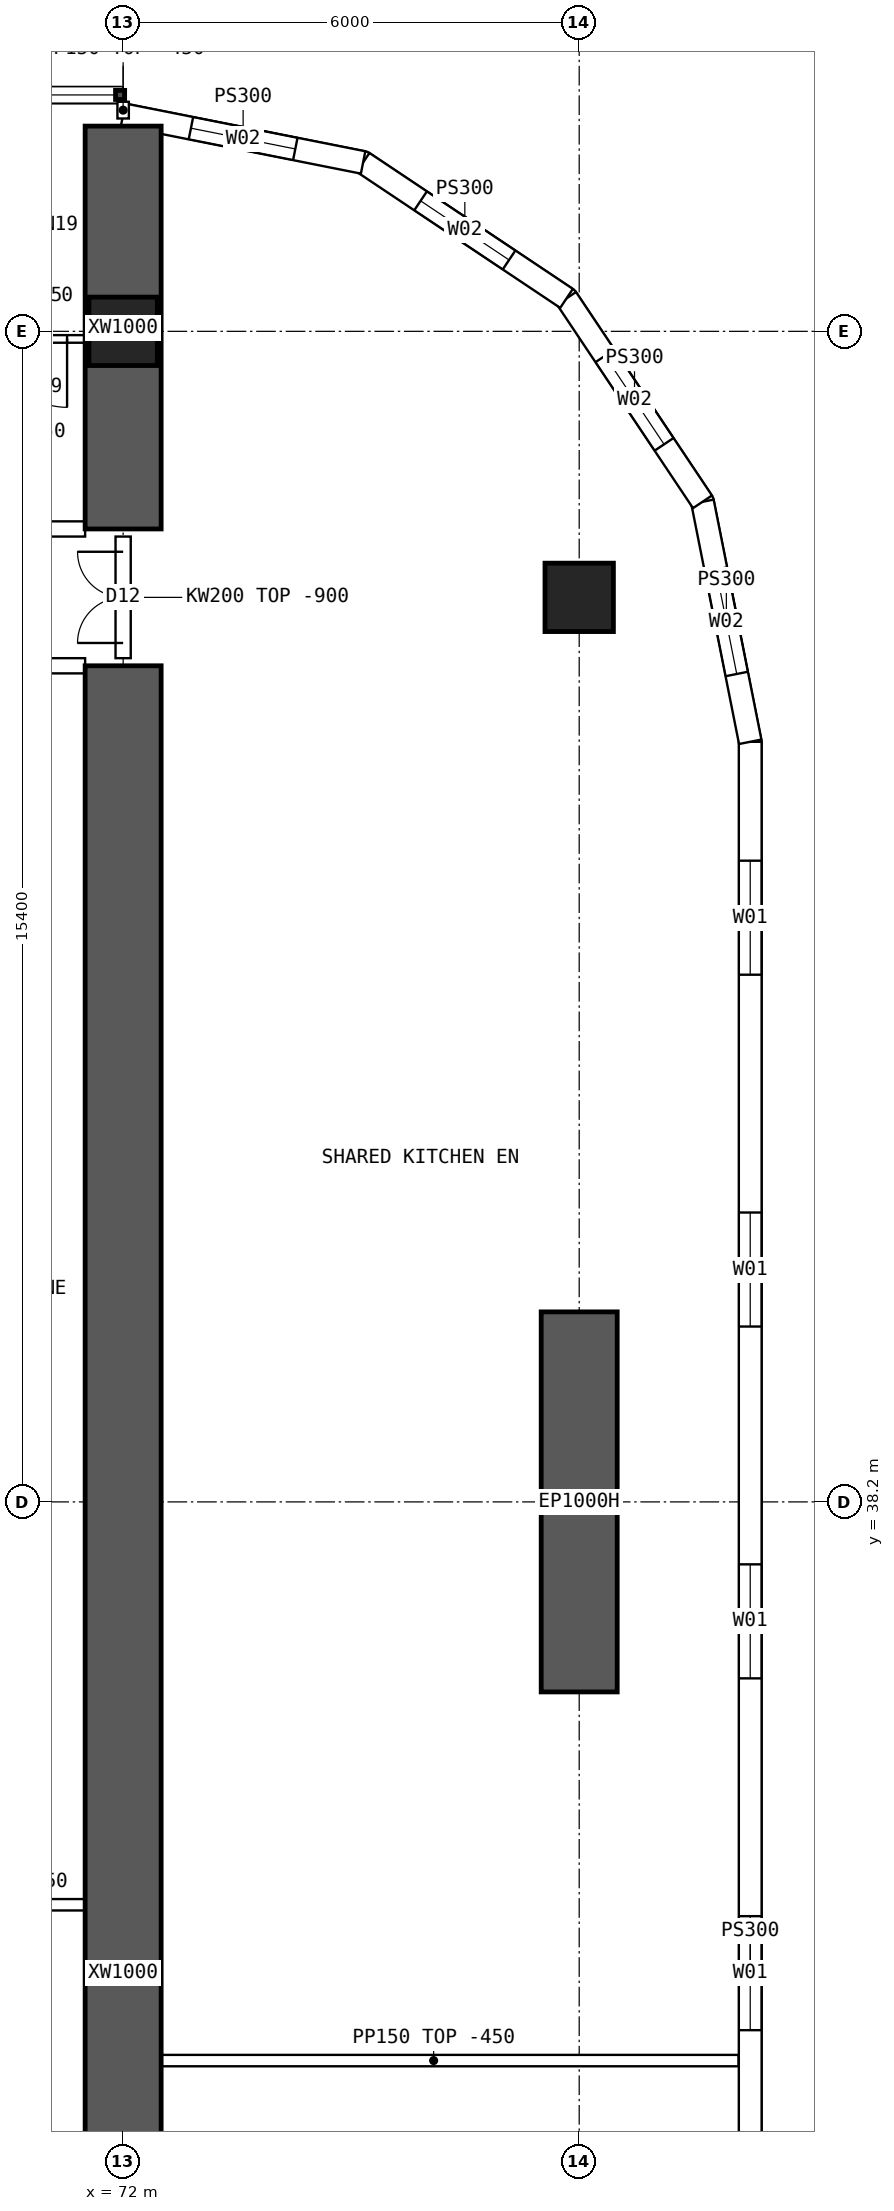
"""IFC4 building model, lengths in metres.
Left out: names, types, materials, properties, quantities, classifications, styles, units other than length and angle.
Written with IfcOpenShell. Run it as: python <this file> out.ifc"""

import sys

from ifc_helpers import new_model, si_unit, direction, frame, frame_2d, origin, origin_2d, place, context, subcontext, project, spatial, polyline, rectangle, hollow_rectangle, outline, extrude, element, fill, save


model = new_model("IFC4")
c1 = context("Model", 3, precision=1e-05, world=origin(), true_north=direction((0.0, 1.0)))
c2 = subcontext(c1, "Body", "Model", "MODEL_VIEW")
j1 = project(units=[si_unit("LENGTHUNIT", "METRE"), si_unit("PLANEANGLEUNIT", "RADIAN")], contexts=[c1])
p1 = place(None, origin())
s1 = spatial("IfcSite", under=j1, at=p1, CompositionType="ELEMENT")
p2 = place(p1, origin())
s2 = spatial("IfcBuilding", under=s1, at=p2, CompositionType="ELEMENT")
p3 = place(p2, frame((0.0, 0.0, 20.2)))
s3 = spatial("IfcBuildingStorey", under=s2, at=p3, CompositionType="ELEMENT", Elevation=20.2)
for number, where, z_axis, x_axis in (
    (1, (72.0, 53.6, 0.0), (0.0, 0.0, 1.0), (1.0, 0.0, 0.0)),
    (2, (78.0, 50.1, 0.0), (0.0, 0.0, 1.0), (1.0, 0.0, 0.0)),
):
    element("IfcColumn", number, at=place(p3, frame(where, z_axis=z_axis, x_axis=x_axis)), inside=s3, PredefinedType="COLUMN", context=c2, shape_type="SweptSolid", body=[
        extrude(hollow_rectangle(XDim=0.9, YDim=0.9, WallThickness=0.09, at=origin_2d()), origin(), (0.0, 0.0, 1.0), 3.75),
    ])
p4 = place(p3, frame((78.0, 35.7, 0.0), z_axis=(0.0, 0.0, 1.0), x_axis=(0.0, 1.0, 0.0)))
e3 = element("IfcWall", 3, at=p4, inside=s3, PredefinedType="SHEAR", context=c2, shape_type="SweptSolid", body=[
    extrude(rectangle(XDim=5.0, YDim=1.0, at=frame_2d((2.5, 0.0))), origin(), (0.0, 0.0, 1.0), 3.75),
])
p5 = place(p3, frame((72.0, 51.0, 0.0), z_axis=(0.0, 0.0, 1.0), x_axis=(0.0, 1.0, 0.0)))
e4 = element("IfcWall", 4, at=p5, inside=s3, PredefinedType="SHEAR", context=c2, shape_type="SweptSolid", body=[
    extrude(rectangle(XDim=5.3, YDim=1.0, at=frame_2d((2.65, 0.0))), origin(), (0.0, 0.0, 1.0), 3.75),
])
p6 = place(p3, frame((72.0, 14.8, 0.0), z_axis=(0.0, 0.0, 1.0), x_axis=(0.0, 1.0, 0.0)))
e5 = element("IfcWall", 5, at=p6, inside=s3, PredefinedType="SHEAR", context=c2, shape_type="SweptSolid", body=[
    extrude(rectangle(XDim=34.4, YDim=1.0, at=frame_2d((17.2, 0.0))), origin(), (0.0, 0.0, 1.0), 3.75),
])
p7 = place(p3, frame((80.25, 15.8, 0.0), z_axis=(0.0, 0.0, 1.0), x_axis=(0.0, 1.0, 0.0)))
e6 = element("IfcWall", 6, at=p7, inside=s3, PredefinedType="SOLIDWALL", context=c2, shape_type="SweptSolid", body=[
    extrude(outline(polyline([(-0.015, -0.15), (32.415, -0.15), (32.385, 0.15), (0.015, 0.15), (-0.015, -0.15)])), origin(), (0.0, 0.0, 1.0), 3.3),
])
p8 = place(p7, frame((1.564, 0.0, 0.9)))
e7 = element("IfcOpeningElement", 7, at=p8, cuts=e6, PredefinedType="OPENING", context=c2, shape_type="SweptSolid", body=[
    extrude(rectangle(XDim=1.5, YDim=2.0, at=frame_2d((0.75, 1.0))), frame((0.0, 0.16, 0.0), z_axis=(0.0, -1.0, 0.0), x_axis=(1.0, 0.0, 0.0)), (0.0, 0.0, 1.0), 0.32),
])
p9 = place(p7, frame((6.193, 0.0, 0.9)))
e8 = element("IfcOpeningElement", 8, at=p9, cuts=e6, PredefinedType="OPENING", context=c2, shape_type="SweptSolid", body=[
    extrude(rectangle(XDim=1.5, YDim=2.0, at=frame_2d((0.75, 1.0))), frame((0.0, 0.16, 0.0), z_axis=(0.0, -1.0, 0.0), x_axis=(1.0, 0.0, 0.0)), (0.0, 0.0, 1.0), 0.32),
])
p10 = place(p7, frame((10.822, 0.0, 0.9)))
e9 = element("IfcOpeningElement", 9, at=p10, cuts=e6, PredefinedType="OPENING", context=c2, shape_type="SweptSolid", body=[
    extrude(rectangle(XDim=1.5, YDim=2.0, at=frame_2d((0.75, 1.0))), frame((0.0, 0.16, 0.0), z_axis=(0.0, -1.0, 0.0), x_axis=(1.0, 0.0, 0.0)), (0.0, 0.0, 1.0), 0.32),
])
p11 = place(p7, frame((15.45, 0.0, 0.9)))
e10 = element("IfcOpeningElement", 10, at=p11, cuts=e6, PredefinedType="OPENING", context=c2, shape_type="SweptSolid", body=[
    extrude(rectangle(XDim=1.5, YDim=2.0, at=frame_2d((0.75, 1.0))), frame((0.0, 0.16, 0.0), z_axis=(0.0, -1.0, 0.0), x_axis=(1.0, 0.0, 0.0)), (0.0, 0.0, 1.0), 0.32),
])
p12 = place(p7, frame((20.079, 0.0, 0.9)))
e11 = element("IfcOpeningElement", 11, at=p12, cuts=e6, PredefinedType="OPENING", context=c2, shape_type="SweptSolid", body=[
    extrude(rectangle(XDim=1.5, YDim=2.0, at=frame_2d((0.75, 1.0))), frame((0.0, 0.16, 0.0), z_axis=(0.0, -1.0, 0.0), x_axis=(1.0, 0.0, 0.0)), (0.0, 0.0, 1.0), 0.32),
])
p13 = place(p7, frame((24.707, 0.0, 0.9)))
e12 = element("IfcOpeningElement", 12, at=p13, cuts=e6, PredefinedType="OPENING", context=c2, shape_type="SweptSolid", body=[
    extrude(rectangle(XDim=1.5, YDim=2.0, at=frame_2d((0.75, 1.0))), frame((0.0, 0.16, 0.0), z_axis=(0.0, -1.0, 0.0), x_axis=(1.0, 0.0, 0.0)), (0.0, 0.0, 1.0), 0.32),
])
p14 = place(p7, frame((29.336, 0.0, 0.9)))
e13 = element("IfcOpeningElement", 13, at=p14, cuts=e6, PredefinedType="OPENING", context=c2, shape_type="SweptSolid", body=[
    extrude(rectangle(XDim=1.5, YDim=2.0, at=frame_2d((0.75, 1.0))), frame((0.0, 0.16, 0.0), z_axis=(0.0, -1.0, 0.0), x_axis=(1.0, 0.0, 0.0)), (0.0, 0.0, 1.0), 0.32),
])
p15 = place(p3, frame((80.25, 48.2, 0.0), z_axis=(0.0, 0.0, 1.0), x_axis=(-0.195065901187, 0.980790137692, 0.0)))
e14 = element("IfcWall", 14, at=p15, inside=s3, PredefinedType="SOLIDWALL", context=c2, shape_type="SweptSolid", body=[
    extrude(outline(polyline([(-0.015, -0.15), (3.249, -0.15), (3.189, 0.15), (0.015, 0.15), (-0.015, -0.15)])), origin(), (0.0, 0.0, 1.0), 3.3),
])
p16 = place(p15, frame((0.909, 0.0, 0.9)))
e15 = element("IfcOpeningElement", 15, at=p16, cuts=e14, PredefinedType="OPENING", context=c2, shape_type="SweptSolid", body=[
    extrude(rectangle(XDim=1.4, YDim=1.8, at=frame_2d((0.7, 0.9))), frame((0.0, 0.16, 0.0), z_axis=(0.0, -1.0, 0.0), x_axis=(1.0, 0.0, 0.0)), (0.0, 0.0, 1.0), 0.32),
])
p17 = place(p3, frame((79.622, 51.357, 0.0), z_axis=(0.0, 0.0, 1.0), x_axis=(-0.555609954424, 0.831443069936, 0.0)))
e16 = element("IfcWall", 16, at=p17, inside=s3, PredefinedType="SOLIDWALL", context=c2, shape_type="SweptSolid", body=[
    extrude(outline(polyline([(-0.03, -0.15), (3.249, -0.15), (3.189, 0.15), (0.03, 0.15), (-0.03, -0.15)])), origin(), (0.0, 0.0, 1.0), 3.3),
])
p18 = place(p17, frame((0.909, 0.0, 0.9)))
e17 = element("IfcOpeningElement", 17, at=p18, cuts=e16, PredefinedType="OPENING", context=c2, shape_type="SweptSolid", body=[
    extrude(rectangle(XDim=1.4, YDim=1.8, at=frame_2d((0.7, 0.9))), frame((0.0, 0.16, 0.0), z_axis=(0.0, -1.0, 0.0), x_axis=(1.0, 0.0, 0.0)), (0.0, 0.0, 1.0), 0.32),
])
p19 = place(p3, frame((77.833, 54.034, 0.0), z_axis=(0.0, 0.0, 1.0), x_axis=(-0.831478105043, 0.555557522525, 0.0)))
e18 = element("IfcWall", 18, at=p19, inside=s3, PredefinedType="SOLIDWALL", context=c2, shape_type="SweptSolid", body=[
    extrude(outline(polyline([(-0.03, -0.15), (3.249, -0.15), (3.189, 0.15), (0.03, 0.15), (-0.03, -0.15)])), origin(), (0.0, 0.0, 1.0), 3.3),
])
p20 = place(p19, frame((0.909, 0.0, 0.9)))
e19 = element("IfcOpeningElement", 19, at=p20, cuts=e18, PredefinedType="OPENING", context=c2, shape_type="SweptSolid", body=[
    extrude(rectangle(XDim=1.4, YDim=1.8, at=frame_2d((0.7, 0.9))), frame((0.0, 0.16, 0.0), z_axis=(0.0, -1.0, 0.0), x_axis=(1.0, 0.0, 0.0)), (0.0, 0.0, 1.0), 0.32),
])
p21 = place(p3, frame((75.157, 55.822, 0.0), z_axis=(0.0, 0.0, 1.0), x_axis=(-0.980787251524, 0.195080412259, 0.0)))
e20 = element("IfcWall", 20, at=p21, inside=s3, PredefinedType="SOLIDWALL", context=c2, shape_type="SweptSolid", body=[
    extrude(outline(polyline([(-0.03, -0.15), (3.249, -0.15), (3.189, 0.15), (0.03, 0.15), (-0.03, -0.15)])), origin(), (0.0, 0.0, 1.0), 3.3),
])
p22 = place(p21, frame((0.909, 0.0, 0.9)))
e21 = element("IfcOpeningElement", 21, at=p22, cuts=e20, PredefinedType="OPENING", context=c2, shape_type="SweptSolid", body=[
    extrude(rectangle(XDim=1.4, YDim=1.8, at=frame_2d((0.7, 0.9))), frame((0.0, 0.16, 0.0), z_axis=(0.0, -1.0, 0.0), x_axis=(1.0, 0.0, 0.0)), (0.0, 0.0, 1.0), 0.32),
])
p23 = place(p3, frame((66.5, 51.0, 0.0), z_axis=(0.0, 0.0, 1.0), x_axis=(1.0, 0.0, 0.0)))
e22 = element("IfcWall", 22, at=p23, inside=s3, PredefinedType="SOLIDWALL", context=c2, shape_type="SweptSolid", body=[
    extrude(outline(polyline([(0.0, 0.0), (5.0, 0.0), (5.0, 2.9), (0.0, 2.9), (0.0, 0.0)])), frame((0.0, 0.1, 0.0), z_axis=(0.0, -1.0, 0.0), x_axis=(1.0, 0.0, 0.0)), (0.0, 0.0, 1.0), 0.2),
])
p24 = place(p23, frame((1.425, 0.0, 0.0)))
e23 = element("IfcOpeningElement", 23, at=p24, cuts=e22, PredefinedType="OPENING", context=c2, shape_type="SweptSolid", body=[
    extrude(rectangle(XDim=0.9, YDim=2.1, at=frame_2d((0.45, 1.05))), frame((0.0, 0.11, 0.0), z_axis=(0.0, -1.0, 0.0), x_axis=(1.0, 0.0, 0.0)), (0.0, 0.0, 1.0), 0.22),
])
p25 = place(p23, frame((2.675, 0.0, 0.0)))
e24 = element("IfcOpeningElement", 24, at=p25, cuts=e22, PredefinedType="OPENING", context=c2, shape_type="SweptSolid", body=[
    extrude(rectangle(XDim=0.9, YDim=2.1, at=frame_2d((0.45, 1.05))), frame((0.0, 0.11, 0.0), z_axis=(0.0, -1.0, 0.0), x_axis=(1.0, 0.0, 0.0)), (0.0, 0.0, 1.0), 0.22),
])
p26 = place(p3, frame((66.5, 49.2, 0.0), z_axis=(0.0, 0.0, 1.0), x_axis=(1.0, 0.0, 0.0)))
e25 = element("IfcWall", 25, at=p26, inside=s3, PredefinedType="SOLIDWALL", context=c2, shape_type="SweptSolid", body=[
    extrude(rectangle(XDim=5.0, YDim=0.2, at=frame_2d((2.5, 0.0))), origin(), (0.0, 0.0, 1.0), 3.3),
])
p27 = place(p26, frame((0.2, 0.0, 0.0)))
e26 = element("IfcOpeningElement", 26, at=p27, cuts=e25, PredefinedType="OPENING", context=c2, shape_type="SweptSolid", body=[
    extrude(rectangle(XDim=1.6, YDim=2.1, at=frame_2d((0.8, 1.05))), frame((0.0, 0.11, 0.0), z_axis=(0.0, -1.0, 0.0), x_axis=(1.0, 0.0, 0.0)), (0.0, 0.0, 1.0), 0.22),
])
p28 = place(p3, frame((70.125, 53.5, 0.0), z_axis=(0.0, 0.0, 1.0), x_axis=(1.0, 0.0, 0.0)))
e27 = element("IfcWall", 27, at=p28, inside=s3, PredefinedType="PARTITIONING", context=c2, shape_type="SweptSolid", body=[
    extrude(outline(polyline([(0.0, 0.0), (1.425, 0.0), (1.425, 2.9), (0.0, 2.9), (0.0, 0.0)])), frame((0.0, 0.05, 0.0), z_axis=(0.0, -1.0, 0.0), x_axis=(1.0, 0.0, 0.0)), (0.0, 0.0, 1.0), 0.1),
])
p29 = place(p28, frame((0.238, 0.0, 0.0)))
e28 = element("IfcOpeningElement", 28, at=p29, cuts=e27, PredefinedType="OPENING", context=c2, shape_type="SweptSolid", body=[
    extrude(rectangle(XDim=0.9, YDim=2.1, at=frame_2d((0.45, 1.05))), frame((0.0, 0.06, 0.0), z_axis=(0.0, -1.0, 0.0), x_axis=(1.0, 0.0, 0.0)), (0.0, 0.0, 1.0), 0.12),
])
p30 = place(p3, frame((68.4, 32.9, 0.0), z_axis=(0.0, 0.0, 1.0), x_axis=(1.0, 0.0, 0.0)))
e29 = element("IfcWall", 29, at=p30, inside=s3, PredefinedType="PARTITIONING", context=c2, shape_type="SweptSolid", body=[
    extrude(rectangle(XDim=3.6, YDim=0.15, at=frame_2d((1.8, 0.0))), origin(), (0.0, 0.0, 1.0), 3.3),
])
p31 = place(p3, frame((72.075, 30.85, 0.0), z_axis=(0.0, 0.0, 1.0), x_axis=(1.0, 0.0, 0.0)))
e30 = element("IfcWall", 30, at=p31, inside=s3, PredefinedType="PARTITIONING", context=c2, shape_type="SweptSolid", body=[
    extrude(outline(polyline([(0.0, 0.0), (8.02, 0.0), (8.02, 3.3), (6.227, 3.3), (6.225, 2.85), (5.627, 2.85), (5.625, 3.3), (0.0, 3.3), (0.0, 0.0)])), frame((0.0, 0.075, 0.0), z_axis=(0.0, -1.0, 0.0), x_axis=(1.0, 0.0, 0.0)), (0.0, 0.0, 1.0), 0.15),
])
p32 = place(p3, frame((72.0, 49.3, 0.0), z_axis=(0.0, 0.0, 1.0), x_axis=(0.0, 1.0, 0.0)))
e31 = element("IfcWall", 31, at=p32, inside=s3, PredefinedType="SOLIDWALL", context=c2, shape_type="SweptSolid", body=[
    extrude(outline(polyline([(0.0, 0.0), (1.6, 0.0), (1.6, 2.85), (0.0, 2.85), (0.0, 0.0)])), frame((0.0, 0.1, 0.0), z_axis=(0.0, -1.0, 0.0), x_axis=(1.0, 0.0, 0.0)), (0.0, 0.0, 1.0), 0.2),
])
p33 = place(p32, frame((0.2, 0.0, 0.0)))
e32 = element("IfcOpeningElement", 32, at=p33, cuts=e31, PredefinedType="OPENING", context=c2, shape_type="SweptSolid", body=[
    extrude(rectangle(XDim=1.2, YDim=2.1, at=frame_2d((0.6, 1.05))), frame((0.0, 0.11, 0.0), z_axis=(0.0, -1.0, 0.0), x_axis=(1.0, 0.0, 0.0)), (0.0, 0.0, 1.0), 0.22),
])
p34 = place(p3, frame((72.0, 56.4, 0.0), z_axis=(0.0, 0.0, 1.0), x_axis=(0.0, 1.0, 0.0)))
e33 = element("IfcWall", 33, at=p34, inside=s3, PredefinedType="PARTITIONING", context=c2, shape_type="SweptSolid", body=[
    extrude(rectangle(XDim=0.22, YDim=0.15, at=frame_2d((0.11, 0.0))), origin(), (0.0, 0.0, 1.0), 3.3),
])
p35 = place(p11, origin())
e34 = element("IfcWindow", 34, at=p35, inside=s3, PartitioningType="SINGLE_PANEL", PredefinedType="WINDOW", context=c2, shape_type="SweptSolid", body=[
    extrude(rectangle(XDim=1.5, YDim=2.0, at=frame_2d((0.75, 1.0))), frame((0.0, 0.03, 0.0), z_axis=(0.0, -1.0, 0.0), x_axis=(1.0, 0.0, 0.0)), (0.0, 0.0, 1.0), 0.06),
])
fill(e10, e34)
p36 = place(p12, origin())
e35 = element("IfcWindow", 35, at=p36, inside=s3, PartitioningType="SINGLE_PANEL", PredefinedType="WINDOW", context=c2, shape_type="SweptSolid", body=[
    extrude(rectangle(XDim=1.5, YDim=2.0, at=frame_2d((0.75, 1.0))), frame((0.0, 0.03, 0.0), z_axis=(0.0, -1.0, 0.0), x_axis=(1.0, 0.0, 0.0)), (0.0, 0.0, 1.0), 0.06),
])
fill(e11, e35)
p37 = place(p13, origin())
e36 = element("IfcWindow", 36, at=p37, inside=s3, PartitioningType="SINGLE_PANEL", PredefinedType="WINDOW", context=c2, shape_type="SweptSolid", body=[
    extrude(rectangle(XDim=1.5, YDim=2.0, at=frame_2d((0.75, 1.0))), frame((0.0, 0.03, 0.0), z_axis=(0.0, -1.0, 0.0), x_axis=(1.0, 0.0, 0.0)), (0.0, 0.0, 1.0), 0.06),
])
fill(e12, e36)
p38 = place(p14, origin())
e37 = element("IfcWindow", 37, at=p38, inside=s3, PartitioningType="SINGLE_PANEL", PredefinedType="WINDOW", context=c2, shape_type="SweptSolid", body=[
    extrude(rectangle(XDim=1.5, YDim=2.0, at=frame_2d((0.75, 1.0))), frame((0.0, 0.03, 0.0), z_axis=(0.0, -1.0, 0.0), x_axis=(1.0, 0.0, 0.0)), (0.0, 0.0, 1.0), 0.06),
])
fill(e13, e37)
p39 = place(p16, origin())
e38 = element("IfcWindow", 38, at=p39, inside=s3, PartitioningType="SINGLE_PANEL", PredefinedType="WINDOW", context=c2, shape_type="SweptSolid", body=[
    extrude(rectangle(XDim=1.4, YDim=1.8, at=frame_2d((0.7, 0.9))), frame((0.0, 0.03, 0.0), z_axis=(0.0, -1.0, 0.0), x_axis=(1.0, 0.0, 0.0)), (0.0, 0.0, 1.0), 0.06),
])
fill(e15, e38)
p40 = place(p18, origin())
e39 = element("IfcWindow", 39, at=p40, inside=s3, PartitioningType="SINGLE_PANEL", PredefinedType="WINDOW", context=c2, shape_type="SweptSolid", body=[
    extrude(rectangle(XDim=1.4, YDim=1.8, at=frame_2d((0.7, 0.9))), frame((0.0, 0.03, 0.0), z_axis=(0.0, -1.0, 0.0), x_axis=(1.0, 0.0, 0.0)), (0.0, 0.0, 1.0), 0.06),
])
fill(e17, e39)
p41 = place(p20, origin())
e40 = element("IfcWindow", 40, at=p41, inside=s3, PartitioningType="SINGLE_PANEL", PredefinedType="WINDOW", context=c2, shape_type="SweptSolid", body=[
    extrude(rectangle(XDim=1.4, YDim=1.8, at=frame_2d((0.7, 0.9))), frame((0.0, 0.03, 0.0), z_axis=(0.0, -1.0, 0.0), x_axis=(1.0, 0.0, 0.0)), (0.0, 0.0, 1.0), 0.06),
])
fill(e19, e40)
p42 = place(p22, origin())
e41 = element("IfcWindow", 41, at=p42, inside=s3, PartitioningType="SINGLE_PANEL", PredefinedType="WINDOW", context=c2, shape_type="SweptSolid", body=[
    extrude(rectangle(XDim=1.4, YDim=1.8, at=frame_2d((0.7, 0.9))), frame((0.0, 0.03, 0.0), z_axis=(0.0, -1.0, 0.0), x_axis=(1.0, 0.0, 0.0)), (0.0, 0.0, 1.0), 0.06),
])
fill(e21, e41)
p43 = place(p29, origin())
e42 = element("IfcDoor", 42, at=p43, inside=s3, OperationType="SINGLE_SWING_RIGHT", PredefinedType="DOOR", context=c2, shape_type="SweptSolid", body=[
    extrude(rectangle(XDim=0.9, YDim=2.1, at=frame_2d((0.45, 1.05))), frame((0.0, 0.025, 0.0), z_axis=(0.0, -1.0, 0.0), x_axis=(1.0, 0.0, 0.0)), (0.0, 0.0, 1.0), 0.05),
])
fill(e28, e42)
p44 = place(p33, origin())
e43 = element("IfcDoor", 43, at=p44, inside=s3, OperationType="DOUBLE_DOOR_SINGLE_SWING", PredefinedType="DOOR", context=c2, shape_type="SweptSolid", body=[
    extrude(rectangle(XDim=1.2, YDim=2.1, at=frame_2d((0.6, 1.05))), frame((0.0, 0.025, 0.0), z_axis=(0.0, -1.0, 0.0), x_axis=(1.0, 0.0, 0.0)), (0.0, 0.0, 1.0), 0.05),
])
fill(e32, e43)
save(model, sys.argv[1])
